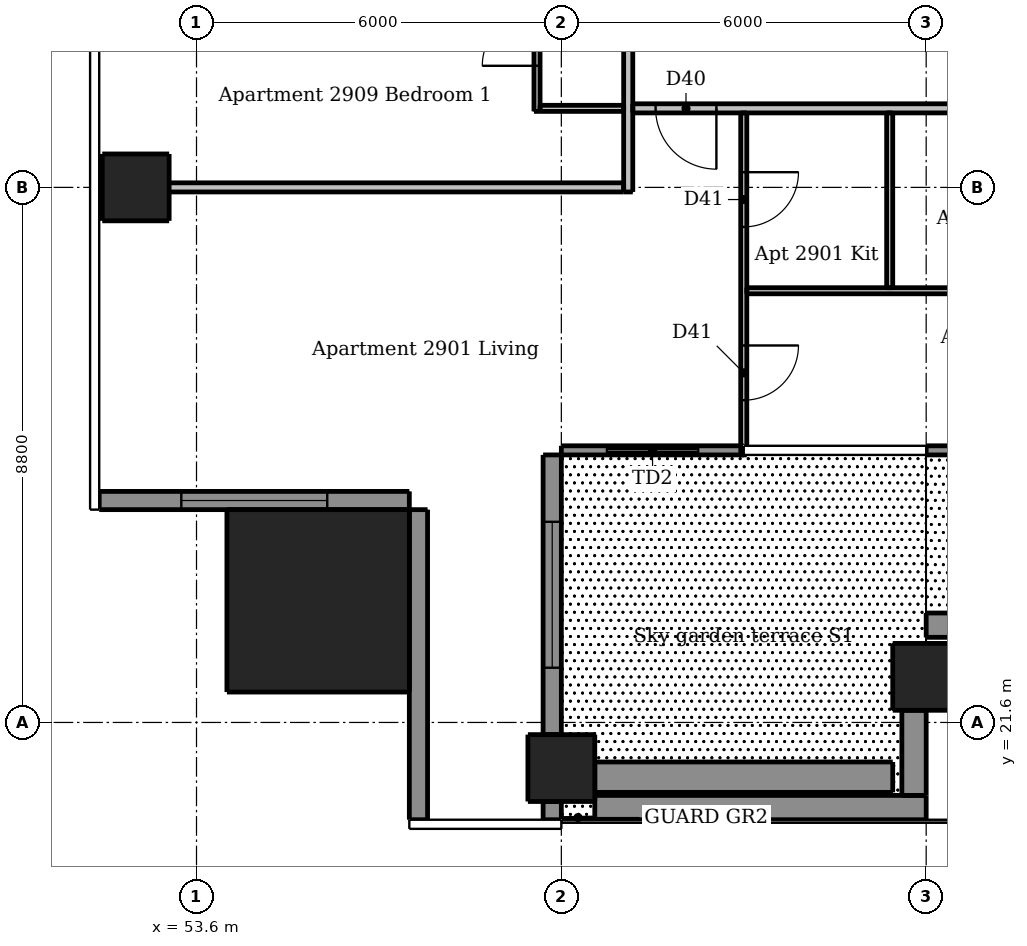
"""IFC4 building model, lengths in metres.
Left out: names, types, materials, properties, quantities, classifications, styles, units other than length and angle.
Written with IfcOpenShell. Run it as: python <this file> out.ifc"""

import sys

from ifc_helpers import new_model, si_unit, direction, frame, frame_2d, origin, origin_2d, place, context, subcontext, project, spatial, rectangle, extrude, element, fill, save


model = new_model("IFC4")
c1 = context("Model", 3, precision=1e-05, world=origin(), true_north=direction((0.0, 1.0)))
c2 = subcontext(c1, "Body", "Model", "MODEL_VIEW")
j1 = project(units=[si_unit("LENGTHUNIT", "METRE"), si_unit("PLANEANGLEUNIT", "RADIAN")], contexts=[c1])
p1 = place(None, origin())
s1 = spatial("IfcSite", under=j1, at=p1, CompositionType="ELEMENT")
p2 = place(p1, origin())
s2 = spatial("IfcBuilding", under=s1, at=p2, CompositionType="ELEMENT")
p3 = place(p2, frame((0.0, 0.0, 108.4)))
s3 = spatial("IfcBuildingStorey", under=s2, at=p3, CompositionType="ELEMENT", Elevation=108.4)
for number, where, z_axis, x_axis in (
    (1, (59.6, 20.85, 0.0), (0.0, 0.0, 1.0), (1.0, 0.0, 0.0)),
    (2, (65.6, 22.35, 0.0), (0.0, 0.0, 1.0), (1.0, 0.0, 0.0)),
):
    element("IfcColumn", number, at=place(p3, frame(where, z_axis=z_axis, x_axis=x_axis)), inside=s3, PredefinedType="COLUMN", context=c2, shape_type="SweptSolid", body=[
        extrude(rectangle(XDim=1.1, YDim=1.1, at=origin_2d()), origin(), (0.0, 0.0, 1.0), 3.3),
    ])
p4 = place(p3, frame((52.6, 30.4, 0.0), z_axis=(0.0, 0.0, 1.0), x_axis=(1.0, 0.0, 0.0)))
e3 = element("IfcColumn", 3, at=p4, inside=s3, PredefinedType="COLUMN", context=c2, shape_type="SweptSolid", body=[
    extrude(rectangle(XDim=1.1, YDim=1.1, at=origin_2d()), origin(), (0.0, 0.0, 1.0), 3.05),
])
p5 = place(p3, frame((55.6, 23.6, 0.0), z_axis=(0.0, 0.0, 1.0), x_axis=(1.0, 0.0, 0.0)))
e4 = element("IfcColumn", 4, at=p5, inside=s3, PredefinedType="COLUMN", context=c2, shape_type="SweptSolid", body=[
    extrude(rectangle(XDim=3.0, YDim=3.0, at=origin_2d()), origin(), (0.0, 0.0, 1.0), 3.3),
])
p6 = place(p3, frame((59.45, 20.0, 0.0), z_axis=(0.0, 0.0, 1.0), x_axis=(0.0, 1.0, 0.0)))
e5 = element("IfcWall", 5, at=p6, inside=s3, PredefinedType="SOLIDWALL", context=c2, shape_type="SweptSolid", body=[
    extrude(rectangle(XDim=0.3, YDim=0.3, at=frame_2d((0.15, 0.0))), origin(), (0.0, 0.0, 1.0), 3.05),
])
p7 = place(p3, frame((59.45, 21.4, 0.0), z_axis=(0.0, 0.0, 1.0), x_axis=(0.0, 1.0, 0.0)))
e6 = element("IfcWall", 6, at=p7, inside=s3, PredefinedType="SOLIDWALL", context=c2, shape_type="SweptSolid", body=[
    extrude(rectangle(XDim=4.6, YDim=0.3, at=frame_2d((2.3, 0.0))), origin(), (0.0, 0.0, 1.0), 3.05),
])
p8 = place(p7, frame((1.1, 0.0, 0.15)))
e7 = element("IfcOpeningElement", 7, at=p8, cuts=e6, PredefinedType="OPENING", context=c2, shape_type="SweptSolid", body=[
    extrude(rectangle(XDim=2.4, YDim=2.1, at=frame_2d((1.2, 1.05))), frame((0.0, 0.16, 0.0), z_axis=(0.0, -1.0, 0.0), x_axis=(1.0, 0.0, 0.0)), (0.0, 0.0, 1.0), 0.32),
])
p9 = place(p3, frame((52.0, 25.25, 0.0), z_axis=(0.0, 0.0, 1.0), x_axis=(1.0, 0.0, 0.0)))
e8 = element("IfcWall", 8, at=p9, inside=s3, PredefinedType="SOLIDWALL", context=c2, shape_type="SweptSolid", body=[
    extrude(rectangle(XDim=5.1, YDim=0.3, at=frame_2d((2.55, 0.0))), origin(), (0.0, 0.0, 1.0), 3.05),
])
p10 = place(p9, frame((1.35, 0.0, 0.15)))
e9 = element("IfcOpeningElement", 9, at=p10, cuts=e8, PredefinedType="OPENING", context=c2, shape_type="SweptSolid", body=[
    extrude(rectangle(XDim=2.4, YDim=2.1, at=frame_2d((1.2, 1.05))), frame((0.0, 0.16, 0.0), z_axis=(0.0, -1.0, 0.0), x_axis=(1.0, 0.0, 0.0)), (0.0, 0.0, 1.0), 0.32),
])
p11 = place(p3, frame((57.25, 25.1, 0.0), z_axis=(0.0, 0.0, 1.0), x_axis=(0.0, -1.0, 0.0)))
e10 = element("IfcWall", 10, at=p11, inside=s3, PredefinedType="SOLIDWALL", context=c2, shape_type="SweptSolid", body=[
    extrude(rectangle(XDim=5.1, YDim=0.3, at=frame_2d((2.55, 0.0))), origin(), (0.0, 0.0, 1.0), 3.05),
])
p12 = place(p3, frame((59.6, 26.075, 0.0), z_axis=(0.0, 0.0, 1.0), x_axis=(1.0, 0.0, 0.0)))
e11 = element("IfcWall", 11, at=p12, inside=s3, PredefinedType="SOLIDWALL", context=c2, shape_type="SweptSolid", body=[
    extrude(rectangle(XDim=3.0, YDim=0.15, at=frame_2d((1.5, 0.0))), origin(), (0.0, 0.0, 1.0), 3.05),
])
p13 = place(p12, frame((0.75, 0.0, 0.0)))
e12 = element("IfcOpeningElement", 12, at=p13, cuts=e11, PredefinedType="OPENING", context=c2, shape_type="SweptSolid", body=[
    extrude(rectangle(XDim=1.5, YDim=2.4, at=frame_2d((0.75, 1.2))), frame((0.0, 0.085, 0.0), z_axis=(0.0, -1.0, 0.0), x_axis=(1.0, 0.0, 0.0)), (0.0, 0.0, 1.0), 0.17),
])
p14 = place(p3, frame((65.6, 26.075, 0.0), z_axis=(0.0, 0.0, 1.0), x_axis=(1.0, 0.0, 0.0)))
e13 = element("IfcWall", 13, at=p14, inside=s3, PredefinedType="SOLIDWALL", context=c2, shape_type="SweptSolid", body=[
    extrude(rectangle(XDim=3.0, YDim=0.15, at=frame_2d((1.5, 0.0))), origin(), (0.0, 0.0, 1.0), 3.05),
])
p15 = place(p14, frame((0.75, 0.0, 0.0)))
e14 = element("IfcOpeningElement", 14, at=p15, cuts=e13, PredefinedType="OPENING", context=c2, shape_type="SweptSolid", body=[
    extrude(rectangle(XDim=1.5, YDim=2.4, at=frame_2d((0.75, 1.2))), frame((0.0, 0.085, 0.0), z_axis=(0.0, -1.0, 0.0), x_axis=(1.0, 0.0, 0.0)), (0.0, 0.0, 1.0), 0.17),
])
p16 = place(p3, frame((60.15, 20.2, 0.03), z_axis=(0.0, 0.0, 1.0), x_axis=(1.0, 0.0, 0.0)))
e15 = element("IfcWall", 15, at=p16, inside=s3, PredefinedType="PARAPET", context=c2, shape_type="SweptSolid", body=[
    extrude(rectangle(XDim=5.45, YDim=0.4, at=frame_2d((2.725, 0.0))), origin(), (0.0, 0.0, 1.0), 1.1),
])
p17 = place(p3, frame((65.4, 20.4, 0.03), z_axis=(0.0, 0.0, 1.0), x_axis=(0.0, 1.0, 0.0)))
e16 = element("IfcWall", 16, at=p17, inside=s3, PredefinedType="PARAPET", context=c2, shape_type="SweptSolid", body=[
    extrude(rectangle(XDim=1.4, YDim=0.4, at=frame_2d((0.7, 0.0))), origin(), (0.0, 0.0, 1.0), 1.1),
])
p18 = place(p3, frame((60.15, 20.7, 0.03), z_axis=(0.0, 0.0, 1.0), x_axis=(1.0, 0.0, 0.0)))
e17 = element("IfcWall", 17, at=p18, inside=s3, PredefinedType="SOLIDWALL", context=c2, shape_type="SweptSolid", body=[
    extrude(rectangle(XDim=4.9, YDim=0.5, at=frame_2d((2.45, 0.0))), origin(), (0.0, 0.0, 1.0), 0.6),
])
p19 = place(p3, frame((65.6, 23.2, 0.03), z_axis=(0.0, 0.0, 1.0), x_axis=(1.0, 0.0, 0.0)))
e18 = element("IfcWall", 18, at=p19, inside=s3, PredefinedType="PARAPET", context=c2, shape_type="SweptSolid", body=[
    extrude(rectangle(XDim=6.0, YDim=0.4, at=frame_2d((3.0, 0.0))), origin(), (0.0, 0.0, 1.0), 1.1),
])
p20 = place(p3, frame((59.2, 31.65, 0.0), z_axis=(0.0, 0.0, 1.0), x_axis=(0.0, 1.0, 0.0)))
e19 = element("IfcWall", 19, at=p20, inside=s3, PredefinedType="PARTITIONING", context=c2, shape_type="SweptSolid", body=[
    extrude(rectangle(XDim=16.675, YDim=0.1, at=frame_2d((8.337, 0.0))), origin(), (0.0, 0.0, 1.0), 3.05),
])
p21 = place(p20, frame((12.1, 0.0, 0.0)))
e20 = element("IfcOpeningElement", 20, at=p21, cuts=e19, PredefinedType="OPENING", context=c2, shape_type="SweptSolid", body=[
    extrude(rectangle(XDim=0.9, YDim=2.1, at=frame_2d((0.45, 1.05))), frame((0.0, 0.06, 0.0), z_axis=(0.0, -1.0, 0.0), x_axis=(1.0, 0.0, 0.0)), (0.0, 0.0, 1.0), 0.12),
])
p22 = place(p20, frame((15.1, 0.0, 0.0)))
e21 = element("IfcOpeningElement", 21, at=p22, cuts=e19, PredefinedType="OPENING", context=c2, shape_type="SweptSolid", body=[
    extrude(rectangle(XDim=0.9, YDim=2.1, at=frame_2d((0.45, 1.05))), frame((0.0, 0.06, 0.0), z_axis=(0.0, -1.0, 0.0), x_axis=(1.0, 0.0, 0.0)), (0.0, 0.0, 1.0), 0.12),
])
p23 = place(p20, frame((0.75, 0.0, 0.0)))
e22 = element("IfcOpeningElement", 22, at=p23, cuts=e19, PredefinedType="OPENING", context=c2, shape_type="SweptSolid", body=[
    extrude(rectangle(XDim=0.9, YDim=2.1, at=frame_2d((0.45, 1.05))), frame((0.0, 0.06, 0.0), z_axis=(0.0, -1.0, 0.0), x_axis=(1.0, 0.0, 0.0)), (0.0, 0.0, 1.0), 0.12),
])
p24 = place(p20, frame((6.1, 0.0, 0.0)))
e23 = element("IfcOpeningElement", 23, at=p24, cuts=e19, PredefinedType="OPENING", context=c2, shape_type="SweptSolid", body=[
    extrude(rectangle(XDim=0.9, YDim=2.1, at=frame_2d((0.45, 1.05))), frame((0.0, 0.06, 0.0), z_axis=(0.0, -1.0, 0.0), x_axis=(1.0, 0.0, 0.0)), (0.0, 0.0, 1.0), 0.12),
])
p25 = place(p20, frame((3.15, 0.0, 0.0)))
e24 = element("IfcOpeningElement", 24, at=p25, cuts=e19, PredefinedType="OPENING", context=c2, shape_type="SweptSolid", body=[
    extrude(rectangle(XDim=0.8, YDim=2.1, at=frame_2d((0.4, 1.05))), frame((0.0, 0.06, 0.0), z_axis=(0.0, -1.0, 0.0), x_axis=(1.0, 0.0, 0.0)), (0.0, 0.0, 1.0), 0.12),
])
p26 = place(p20, frame((9.15, 0.0, 0.0)))
e25 = element("IfcOpeningElement", 25, at=p26, cuts=e19, PredefinedType="OPENING", context=c2, shape_type="SweptSolid", body=[
    extrude(rectangle(XDim=0.8, YDim=2.1, at=frame_2d((0.4, 1.05))), frame((0.0, 0.06, 0.0), z_axis=(0.0, -1.0, 0.0), x_axis=(1.0, 0.0, 0.0)), (0.0, 0.0, 1.0), 0.12),
])
p27 = place(p3, frame((62.6, 31.625, 0.0), z_axis=(0.0, 0.0, 1.0), x_axis=(0.0, -1.0, 0.0)))
e26 = element("IfcWall", 26, at=p27, inside=s3, PredefinedType="PARTITIONING", context=c2, shape_type="SweptSolid", body=[
    extrude(rectangle(XDim=5.625, YDim=0.1, at=frame_2d((2.812, 0.0))), origin(), (0.0, 0.0, 1.0), 3.05),
])
p28 = place(p27, frame((0.975, 0.0, 0.0)))
e27 = element("IfcOpeningElement", 27, at=p28, cuts=e26, PredefinedType="OPENING", context=c2, shape_type="SweptSolid", body=[
    extrude(rectangle(XDim=0.9, YDim=2.1, at=frame_2d((0.45, 1.05))), frame((0.0, 0.06, 0.0), z_axis=(0.0, -1.0, 0.0), x_axis=(1.0, 0.0, 0.0)), (0.0, 0.0, 1.0), 0.12),
])
p29 = place(p27, frame((3.825, 0.0, 0.0)))
e28 = element("IfcOpeningElement", 28, at=p29, cuts=e26, PredefinedType="OPENING", context=c2, shape_type="SweptSolid", body=[
    extrude(rectangle(XDim=0.9, YDim=2.1, at=frame_2d((0.45, 1.05))), frame((0.0, 0.06, 0.0), z_axis=(0.0, -1.0, 0.0), x_axis=(1.0, 0.0, 0.0)), (0.0, 0.0, 1.0), 0.12),
])
p30 = place(p3, frame((65.0, 28.75, 0.0), z_axis=(0.0, 0.0, 1.0), x_axis=(0.0, 1.0, 0.0)))
e29 = element("IfcWall", 29, at=p30, inside=s3, PredefinedType="PARTITIONING", context=c2, shape_type="SweptSolid", body=[
    extrude(rectangle(XDim=2.875, YDim=0.1, at=frame_2d((1.438, 0.0))), origin(), (0.0, 0.0, 1.0), 3.05),
])
p31 = place(p3, frame((59.25, 31.7, 0.0), z_axis=(0.0, 0.0, 1.0), x_axis=(1.0, 0.0, 0.0)))
e30 = element("IfcWall", 30, at=p31, inside=s3, PredefinedType="PARTITIONING", context=c2, shape_type="SweptSolid", body=[
    extrude(rectangle(XDim=1.375, YDim=0.1, at=frame_2d((0.688, 0.0))), origin(), (0.0, 0.0, 1.0), 3.05),
])
p32 = place(p3, frame((62.65, 28.7, 0.0), z_axis=(0.0, 0.0, 1.0), x_axis=(1.0, 0.0, 0.0)))
e31 = element("IfcWall", 31, at=p32, inside=s3, PredefinedType="PARTITIONING", context=c2, shape_type="SweptSolid", body=[
    extrude(rectangle(XDim=5.875, YDim=0.1, at=frame_2d((2.938, 0.0))), origin(), (0.0, 0.0, 1.0), 3.05),
])
p33 = place(p32, frame((3.75, 0.0, 0.0)))
e32 = element("IfcOpeningElement", 32, at=p33, cuts=e31, PredefinedType="OPENING", context=c2, shape_type="SweptSolid", body=[
    extrude(rectangle(XDim=0.8, YDim=2.1, at=frame_2d((0.4, 1.05))), frame((0.0, 0.06, 0.0), z_axis=(0.0, -1.0, 0.0), x_axis=(1.0, 0.0, 0.0)), (0.0, 0.0, 1.0), 0.12),
])
p34 = place(p3, frame((60.7, 30.325, 0.0), z_axis=(0.0, 0.0, 1.0), x_axis=(0.0, 1.0, 0.0)))
e33 = element("IfcWall", 33, at=p34, inside=s3, PredefinedType="PARTITIONING", context=c2, shape_type="SweptSolid", body=[
    extrude(rectangle(XDim=28.9, YDim=0.15, at=frame_2d((14.45, 0.0))), origin(), (0.0, 0.0, 1.0), 3.05),
])
p35 = place(p34, frame((9.225, 0.0, 0.0)))
e34 = element("IfcOpeningElement", 34, at=p35, cuts=e33, PredefinedType="OPENING", context=c2, shape_type="SweptSolid", body=[
    extrude(rectangle(XDim=1.0, YDim=2.1, at=frame_2d((0.5, 1.05))), frame((0.0, 0.085, 0.0), z_axis=(0.0, -1.0, 0.0), x_axis=(1.0, 0.0, 0.0)), (0.0, 0.0, 1.0), 0.17),
])
p36 = place(p34, frame((26.025, 0.0, 0.0)))
e35 = element("IfcOpeningElement", 35, at=p36, cuts=e33, PredefinedType="OPENING", context=c2, shape_type="SweptSolid", body=[
    extrude(rectangle(XDim=1.0, YDim=2.1, at=frame_2d((0.5, 1.05))), frame((0.0, 0.085, 0.0), z_axis=(0.0, -1.0, 0.0), x_axis=(1.0, 0.0, 0.0)), (0.0, 0.0, 1.0), 0.17),
])
p37 = place(p3, frame((89.525, 31.7, 0.0), z_axis=(0.0, 0.0, 1.0), x_axis=(-1.0, 0.0, 0.0)))
e36 = element("IfcWall", 36, at=p37, inside=s3, PredefinedType="PARTITIONING", context=c2, shape_type="SweptSolid", body=[
    extrude(rectangle(XDim=28.75, YDim=0.15, at=frame_2d((14.375, 0.0))), origin(), (0.0, 0.0, 1.0), 3.05),
])
p38 = place(p37, frame((27.375, 0.0, 0.0)))
e37 = element("IfcOpeningElement", 37, at=p38, cuts=e36, PredefinedType="OPENING", context=c2, shape_type="SweptSolid", body=[
    extrude(rectangle(XDim=1.0, YDim=2.1, at=frame_2d((0.5, 1.05))), frame((0.0, 0.085, 0.0), z_axis=(0.0, -1.0, 0.0), x_axis=(1.0, 0.0, 0.0)), (0.0, 0.0, 1.0), 0.17),
])
p39 = place(p37, frame((12.625, 0.0, 0.0)))
e38 = element("IfcOpeningElement", 38, at=p39, cuts=e36, PredefinedType="OPENING", context=c2, shape_type="SweptSolid", body=[
    extrude(rectangle(XDim=1.0, YDim=2.1, at=frame_2d((0.5, 1.05))), frame((0.0, 0.085, 0.0), z_axis=(0.0, -1.0, 0.0), x_axis=(1.0, 0.0, 0.0)), (0.0, 0.0, 1.0), 0.17),
])
p40 = place(p37, frame((2.425, 0.0, 0.0)))
e39 = element("IfcOpeningElement", 39, at=p40, cuts=e36, PredefinedType="OPENING", context=c2, shape_type="SweptSolid", body=[
    extrude(rectangle(XDim=1.0, YDim=2.1, at=frame_2d((0.5, 1.05))), frame((0.0, 0.085, 0.0), z_axis=(0.0, -1.0, 0.0), x_axis=(1.0, 0.0, 0.0)), (0.0, 0.0, 1.0), 0.17),
])
p41 = place(p3, frame((52.0, 30.4, 0.0), z_axis=(0.0, 0.0, 1.0), x_axis=(1.0, 0.0, 0.0)))
e40 = element("IfcWall", 40, at=p41, inside=s3, PredefinedType="PARTITIONING", context=c2, shape_type="SweptSolid", body=[
    extrude(rectangle(XDim=8.625, YDim=0.15, at=frame_2d((4.312, 0.0))), origin(), (0.0, 0.0, 1.0), 2.647),
])
p42 = place(p8, origin())
e41 = element("IfcWindow", 41, at=p42, inside=s3, PartitioningType="DOUBLE_PANEL_VERTICAL", PredefinedType="WINDOW", context=c2, shape_type="SweptSolid", body=[
    extrude(rectangle(XDim=2.4, YDim=2.1, at=frame_2d((1.2, 1.05))), frame((0.0, 0.03, 0.0), z_axis=(0.0, -1.0, 0.0), x_axis=(1.0, 0.0, 0.0)), (0.0, 0.0, 1.0), 0.06),
])
fill(e7, e41)
p43 = place(p10, origin())
e42 = element("IfcWindow", 42, at=p43, inside=s3, PartitioningType="DOUBLE_PANEL_VERTICAL", PredefinedType="WINDOW", context=c2, shape_type="SweptSolid", body=[
    extrude(rectangle(XDim=2.4, YDim=2.1, at=frame_2d((1.2, 1.05))), frame((0.0, 0.03, 0.0), z_axis=(0.0, -1.0, 0.0), x_axis=(1.0, 0.0, 0.0)), (0.0, 0.0, 1.0), 0.06),
])
fill(e9, e42)
p44 = place(p13, origin())
e43 = element("IfcDoor", 43, at=p44, inside=s3, OperationType="DOUBLE_DOOR_SLIDING", PredefinedType="DOOR", context=c2, shape_type="SweptSolid", body=[
    extrude(rectangle(XDim=1.5, YDim=2.4, at=frame_2d((0.75, 1.2))), frame((0.0, 0.025, 0.0), z_axis=(0.0, -1.0, 0.0), x_axis=(1.0, 0.0, 0.0)), (0.0, 0.0, 1.0), 0.05),
])
fill(e12, e43)
p45 = place(p38, origin())
e44 = element("IfcDoor", 44, at=p45, inside=s3, OperationType="SINGLE_SWING_LEFT", PredefinedType="DOOR", context=c2, shape_type="SweptSolid", body=[
    extrude(rectangle(XDim=1.0, YDim=2.1, at=frame_2d((0.5, 1.05))), frame((0.0, 0.025, 0.0), z_axis=(0.0, -1.0, 0.0), x_axis=(1.0, 0.0, 0.0)), (0.0, 0.0, 1.0), 0.05),
])
fill(e37, e44)
p46 = place(p28, origin())
e45 = element("IfcDoor", 45, at=p46, inside=s3, OperationType="SINGLE_SWING_LEFT", PredefinedType="DOOR", context=c2, shape_type="SweptSolid", body=[
    extrude(rectangle(XDim=0.9, YDim=2.1, at=frame_2d((0.45, 1.05))), frame((0.0, 0.025, 0.0), z_axis=(0.0, -1.0, 0.0), x_axis=(1.0, 0.0, 0.0)), (0.0, 0.0, 1.0), 0.05),
])
fill(e27, e45)
p47 = place(p29, origin())
e46 = element("IfcDoor", 46, at=p47, inside=s3, OperationType="SINGLE_SWING_LEFT", PredefinedType="DOOR", context=c2, shape_type="SweptSolid", body=[
    extrude(rectangle(XDim=0.9, YDim=2.1, at=frame_2d((0.45, 1.05))), frame((0.0, 0.025, 0.0), z_axis=(0.0, -1.0, 0.0), x_axis=(1.0, 0.0, 0.0)), (0.0, 0.0, 1.0), 0.05),
])
fill(e28, e46)
p48 = place(p23, origin())
e47 = element("IfcDoor", 47, at=p48, inside=s3, OperationType="SINGLE_SWING_LEFT", PredefinedType="DOOR", context=c2, shape_type="SweptSolid", body=[
    extrude(rectangle(XDim=0.9, YDim=2.1, at=frame_2d((0.45, 1.05))), frame((0.0, 0.025, 0.0), z_axis=(0.0, -1.0, 0.0), x_axis=(1.0, 0.0, 0.0)), (0.0, 0.0, 1.0), 0.05),
])
fill(e22, e47)
save(model, sys.argv[1])
